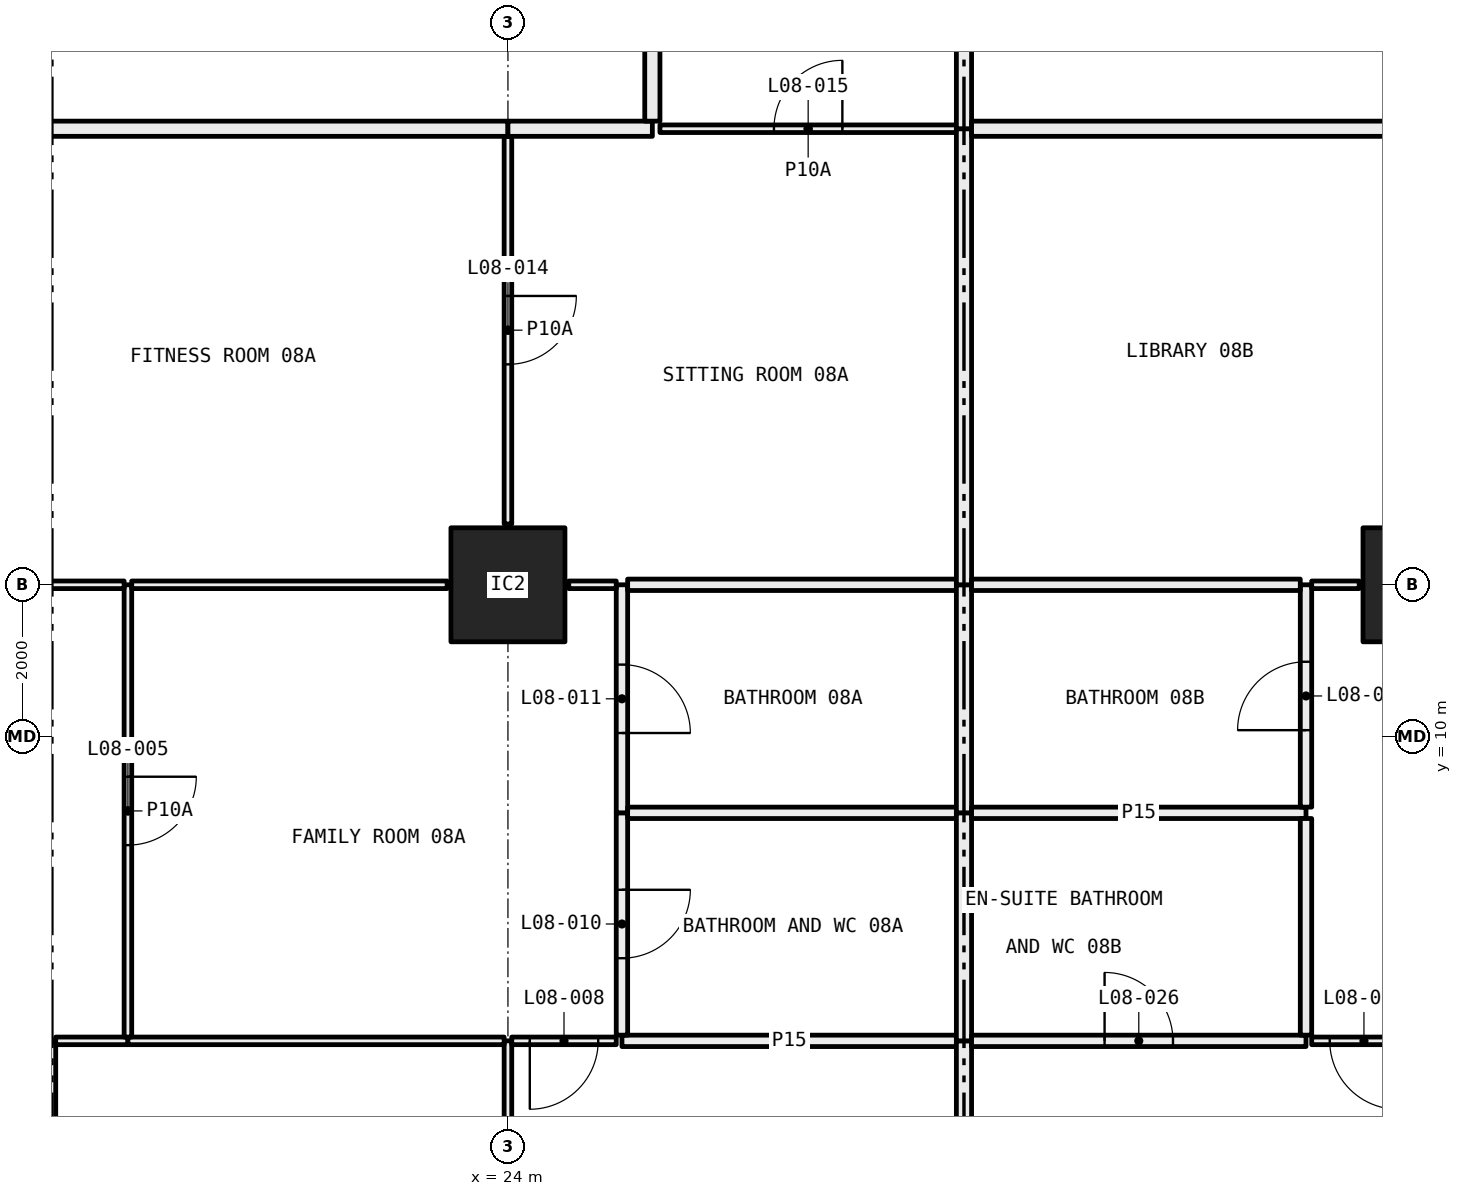
"""IFC4 building model, lengths in metres.
Left out: names, types, materials, properties, quantities, classifications, styles, units other than length and angle.
Written with IfcOpenShell. Run it as: python <this file> out.ifc"""

import sys

from ifc_helpers import new_model, si_unit, direction, frame, frame_2d, origin, origin_2d, place, context, subcontext, project, spatial, rectangle, hollow_rectangle, extrude, element, fill, save


model = new_model("IFC4")
c1 = context("Model", 3, precision=1e-05, world=origin(), true_north=direction((0.0, 1.0)))
c2 = subcontext(c1, "Body", "Model", "MODEL_VIEW")
j1 = project(units=[si_unit("LENGTHUNIT", "METRE"), si_unit("PLANEANGLEUNIT", "RADIAN")], contexts=[c1])
p1 = place(None, origin())
s1 = spatial("IfcSite", under=j1, at=p1, CompositionType="ELEMENT")
p2 = place(p1, origin())
s2 = spatial("IfcBuilding", under=s1, at=p2, CompositionType="ELEMENT")
p3 = place(p2, frame((0.0, 0.0, 40.35)))
s3 = spatial("IfcBuildingStorey", under=s2, at=p3, CompositionType="ELEMENT", Elevation=40.35)
for number, where, z_axis, x_axis in (
    (1, (24.0, 12.0, 0.0), (0.0, 0.0, 1.0), (1.0, 0.0, 0.0)),
    (2, (36.0, 12.0, 0.0), (0.0, 0.0, 1.0), (1.0, 0.0, 0.0)),
):
    element("IfcColumn", number, at=place(p3, frame(where, z_axis=z_axis, x_axis=x_axis)), inside=s3, PredefinedType="COLUMN", context=c2, shape_type="SweptSolid", body=[
        extrude(hollow_rectangle(XDim=1.5, YDim=1.5, WallThickness=0.065, at=origin_2d()), origin(), (0.0, 0.0, 1.0), 3.05),
    ])
p4 = place(p3, frame((18.0, 0.72, 0.0), z_axis=(0.0, 0.0, 1.0), x_axis=(0.0, 1.0, 0.0)))
e3 = element("IfcWall", 3, at=p4, inside=s3, PredefinedType="PARTITIONING", context=c2, shape_type="SweptSolid", body=[
    extrude(rectangle(XDim=5.28, YDim=0.1, at=frame_2d((2.64, 0.0))), origin(), (0.0, 0.0, 1.0), 3.05),
])
p5 = place(p4, frame((2.19, 0.0, 0.0)))
e4 = element("IfcOpeningElement", 4, at=p5, cuts=e3, PredefinedType="OPENING", context=c2, shape_type="SweptSolid", body=[
    extrude(rectangle(XDim=0.9, YDim=2.1, at=frame_2d((0.45, 1.05))), frame((0.0, 0.06, 0.0), z_axis=(0.0, -1.0, 0.0), x_axis=(1.0, 0.0, 0.0)), (0.0, 0.0, 1.0), 0.12),
])
p6 = place(p3, frame((24.0, 0.72, 0.0), z_axis=(0.0, 0.0, 1.0), x_axis=(0.0, 1.0, 0.0)))
e5 = element("IfcWall", 5, at=p6, inside=s3, PredefinedType="PARTITIONING", context=c2, shape_type="SweptSolid", body=[
    extrude(rectangle(XDim=5.28, YDim=0.1, at=frame_2d((2.64, 0.0))), origin(), (0.0, 0.0, 1.0), 2.45),
])
p7 = place(p3, frame((19.0, 6.0, 0.0), z_axis=(0.0, 0.0, 1.0), x_axis=(-1.0, 0.0, 0.0)))
e6 = element("IfcWall", 6, at=p7, inside=s3, PredefinedType="PARTITIONING", context=c2, shape_type="SweptSolid", body=[
    extrude(rectangle(XDim=0.95, YDim=0.1, at=frame_2d((0.475, 0.0))), origin(), (0.0, 0.0, 1.0), 3.05),
])
p8 = place(p3, frame((23.95, 6.0, 0.0), z_axis=(0.0, 0.0, 1.0), x_axis=(-1.0, 0.0, 0.0)))
e7 = element("IfcWall", 7, at=p8, inside=s3, PredefinedType="PARTITIONING", context=c2, shape_type="SweptSolid", body=[
    extrude(rectangle(XDim=4.95, YDim=0.1, at=frame_2d((2.475, 0.0))), origin(), (0.0, 0.0, 1.0), 2.45),
])
p9 = place(p3, frame((25.425, 6.0, 0.0), z_axis=(0.0, 0.0, 1.0), x_axis=(-1.0, 0.0, 0.0)))
e8 = element("IfcWall", 8, at=p9, inside=s3, PredefinedType="PARTITIONING", context=c2, shape_type="SweptSolid", body=[
    extrude(rectangle(XDim=1.375, YDim=0.1, at=frame_2d((0.688, 0.0))), origin(), (0.0, 0.0, 1.0), 2.45),
])
p10 = place(p9, frame((0.238, 0.0, 0.0)))
e9 = element("IfcOpeningElement", 9, at=p10, cuts=e8, PredefinedType="OPENING", context=c2, shape_type="SweptSolid", body=[
    extrude(rectangle(XDim=0.9, YDim=2.1, at=frame_2d((0.45, 1.05))), frame((0.0, 0.06, 0.0), z_axis=(0.0, -1.0, 0.0), x_axis=(1.0, 0.0, 0.0)), (0.0, 0.0, 1.0), 0.12),
])
p11 = place(p3, frame((29.9, 6.0, 0.0), z_axis=(0.0, 0.0, 1.0), x_axis=(-1.0, 0.0, 0.0)))
e10 = element("IfcWall", 10, at=p11, inside=s3, PredefinedType="PARTITIONING", context=c2, shape_type="SweptSolid", body=[
    extrude(rectangle(XDim=4.4, YDim=0.15, at=frame_2d((2.2, 0.0))), origin(), (0.0, 0.0, 1.0), 3.05),
])
p12 = place(p3, frame((30.0, 0.72, 0.0), z_axis=(0.0, 0.0, 1.0), x_axis=(0.0, 1.0, 0.0)))
e11 = element("IfcWall", 11, at=p12, inside=s3, PredefinedType="PARTITIONING", context=c2, shape_type="SweptSolid", body=[
    extrude(rectangle(XDim=5.28, YDim=0.2, at=frame_2d((2.64, 0.0))), origin(), (0.0, 0.0, 1.0), 3.05),
])
p13 = place(p3, frame((19.0, 6.05, 0.0), z_axis=(0.0, 0.0, 1.0), x_axis=(0.0, 1.0, 0.0)))
e12 = element("IfcWall", 12, at=p13, inside=s3, PredefinedType="PARTITIONING", context=c2, shape_type="SweptSolid", body=[
    extrude(rectangle(XDim=5.95, YDim=0.1, at=frame_2d((2.975, 0.0))), origin(), (0.0, 0.0, 1.0), 2.45),
])
p14 = place(p13, frame((2.525, 0.0, 0.0)))
e13 = element("IfcOpeningElement", 13, at=p14, cuts=e12, PredefinedType="OPENING", context=c2, shape_type="SweptSolid", body=[
    extrude(rectangle(XDim=0.9, YDim=2.1, at=frame_2d((0.45, 1.05))), frame((0.0, 0.06, 0.0), z_axis=(0.0, -1.0, 0.0), x_axis=(1.0, 0.0, 0.0)), (0.0, 0.0, 1.0), 0.12),
])
p15 = place(p3, frame((18.95, 12.0, 0.0), z_axis=(0.0, 0.0, 1.0), x_axis=(-1.0, 0.0, 0.0)))
e14 = element("IfcWall", 14, at=p15, inside=s3, PredefinedType="PARTITIONING", context=c2, shape_type="SweptSolid", body=[
    extrude(rectangle(XDim=2.45, YDim=0.1, at=frame_2d((1.225, 0.0))), origin(), (0.0, 0.0, 1.0), 2.45),
])
p16 = place(p3, frame((25.5, 6.075, 0.0), z_axis=(0.0, 0.0, 1.0), x_axis=(0.0, 1.0, 0.0)))
e15 = element("IfcWall", 15, at=p16, inside=s3, PredefinedType="PARTITIONING", context=c2, shape_type="SweptSolid", body=[
    extrude(rectangle(XDim=2.925, YDim=0.15, at=frame_2d((1.462, 0.0))), origin(), (0.0, 0.0, 1.0), 3.05),
])
p17 = place(p16, frame((1.012, 0.0, 0.0)))
e16 = element("IfcOpeningElement", 16, at=p17, cuts=e15, PredefinedType="OPENING", context=c2, shape_type="SweptSolid", body=[
    extrude(rectangle(XDim=0.9, YDim=2.1, at=frame_2d((0.45, 1.05))), frame((0.0, 0.085, 0.0), z_axis=(0.0, -1.0, 0.0), x_axis=(1.0, 0.0, 0.0)), (0.0, 0.0, 1.0), 0.17),
])
p18 = place(p3, frame((25.5, 9.0, 0.0), z_axis=(0.0, 0.0, 1.0), x_axis=(0.0, 1.0, 0.0)))
e17 = element("IfcWall", 17, at=p18, inside=s3, PredefinedType="PARTITIONING", context=c2, shape_type="SweptSolid", body=[
    extrude(rectangle(XDim=3.0, YDim=0.15, at=frame_2d((1.5, 0.0))), origin(), (0.0, 0.0, 1.0), 2.45),
])
p19 = place(p18, frame((1.05, 0.0, 0.0)))
e18 = element("IfcOpeningElement", 18, at=p19, cuts=e17, PredefinedType="OPENING", context=c2, shape_type="SweptSolid", body=[
    extrude(rectangle(XDim=0.9, YDim=2.1, at=frame_2d((0.45, 1.05))), frame((0.0, 0.085, 0.0), z_axis=(0.0, -1.0, 0.0), x_axis=(1.0, 0.0, 0.0)), (0.0, 0.0, 1.0), 0.17),
])
p20 = place(p3, frame((23.2, 12.0, 0.0), z_axis=(0.0, 0.0, 1.0), x_axis=(-1.0, 0.0, 0.0)))
e19 = element("IfcWall", 19, at=p20, inside=s3, PredefinedType="PARTITIONING", context=c2, shape_type="SweptSolid", body=[
    extrude(rectangle(XDim=4.15, YDim=0.1, at=frame_2d((2.075, 0.0))), origin(), (0.0, 0.0, 1.0), 2.45),
])
p21 = place(p3, frame((25.425, 12.0, 0.0), z_axis=(0.0, 0.0, 1.0), x_axis=(-1.0, 0.0, 0.0)))
e20 = element("IfcWall", 20, at=p21, inside=s3, PredefinedType="PARTITIONING", context=c2, shape_type="SweptSolid", body=[
    extrude(rectangle(XDim=0.625, YDim=0.1, at=frame_2d((0.312, 0.0))), origin(), (0.0, 0.0, 1.0), 2.45),
])
p22 = place(p3, frame((29.9, 9.0, 0.0), z_axis=(0.0, 0.0, 1.0), x_axis=(-1.0, 0.0, 0.0)))
e21 = element("IfcWall", 21, at=p22, inside=s3, PredefinedType="PARTITIONING", context=c2, shape_type="SweptSolid", body=[
    extrude(rectangle(XDim=4.325, YDim=0.15, at=frame_2d((2.163, 0.0))), origin(), (0.0, 0.0, 1.0), 3.05),
])
p23 = place(p3, frame((30.0, 6.0, 0.0), z_axis=(0.0, 0.0, 1.0), x_axis=(0.0, 1.0, 0.0)))
e22 = element("IfcWall", 22, at=p23, inside=s3, PredefinedType="PARTITIONING", context=c2, shape_type="SweptSolid", body=[
    extrude(rectangle(XDim=3.0, YDim=0.2, at=frame_2d((1.5, 0.0))), origin(), (0.0, 0.0, 1.0), 3.05),
])
p24 = place(p3, frame((29.9, 12.0, 0.0), z_axis=(0.0, 0.0, 1.0), x_axis=(-1.0, 0.0, 0.0)))
e23 = element("IfcWall", 23, at=p24, inside=s3, PredefinedType="PARTITIONING", context=c2, shape_type="SweptSolid", body=[
    extrude(rectangle(XDim=4.325, YDim=0.15, at=frame_2d((2.163, 0.0))), origin(), (0.0, 0.0, 1.0), 2.45),
])
p25 = place(p3, frame((30.0, 9.0, 0.0), z_axis=(0.0, 0.0, 1.0), x_axis=(0.0, 1.0, 0.0)))
e24 = element("IfcWall", 24, at=p25, inside=s3, PredefinedType="PARTITIONING", context=c2, shape_type="SweptSolid", body=[
    extrude(rectangle(XDim=3.0, YDim=0.2, at=frame_2d((1.5, 0.0))), origin(), (0.0, 0.0, 1.0), 2.45),
])
p26 = place(p3, frame((24.0, 12.8, 0.0), z_axis=(0.0, 0.0, 1.0), x_axis=(0.0, 1.0, 0.0)))
e25 = element("IfcWall", 25, at=p26, inside=s3, PredefinedType="PARTITIONING", context=c2, shape_type="SweptSolid", body=[
    extrude(rectangle(XDim=5.1, YDim=0.1, at=frame_2d((2.55, 0.0))), origin(), (0.0, 0.0, 1.0), 3.05),
])
p27 = place(p26, frame((2.1, 0.0, 0.0)))
e26 = element("IfcOpeningElement", 26, at=p27, cuts=e25, PredefinedType="OPENING", context=c2, shape_type="SweptSolid", body=[
    extrude(rectangle(XDim=0.9, YDim=2.1, at=frame_2d((0.45, 1.05))), frame((0.0, 0.06, 0.0), z_axis=(0.0, -1.0, 0.0), x_axis=(1.0, 0.0, 0.0)), (0.0, 0.0, 1.0), 0.12),
])
p28 = place(p3, frame((24.0, 18.0, 0.0), z_axis=(0.0, 0.0, 1.0), x_axis=(-1.0, 0.0, 0.0)))
e27 = element("IfcWall", 27, at=p28, inside=s3, PredefinedType="PARTITIONING", context=c2, shape_type="SweptSolid", body=[
    extrude(rectangle(XDim=7.5, YDim=0.2, at=frame_2d((3.75, 0.0))), origin(), (0.0, 0.0, 1.0), 3.05),
])
p29 = place(p3, frame((29.9, 18.0, 0.0), z_axis=(0.0, 0.0, 1.0), x_axis=(-1.0, 0.0, 0.0)))
e28 = element("IfcWall", 28, at=p29, inside=s3, PredefinedType="PARTITIONING", context=c2, shape_type="SweptSolid", body=[
    extrude(rectangle(XDim=3.9, YDim=0.1, at=frame_2d((1.95, 0.0))), origin(), (0.0, 0.0, 1.0), 3.05),
])
p30 = place(p29, frame((1.5, 0.0, 0.0)))
e29 = element("IfcOpeningElement", 29, at=p30, cuts=e28, PredefinedType="OPENING", context=c2, shape_type="SweptSolid", body=[
    extrude(rectangle(XDim=0.9, YDim=2.1, at=frame_2d((0.45, 1.05))), frame((0.0, 0.06, 0.0), z_axis=(0.0, -1.0, 0.0), x_axis=(1.0, 0.0, 0.0)), (0.0, 0.0, 1.0), 0.12),
])
p31 = place(p3, frame((30.0, 12.0, 0.0), z_axis=(0.0, 0.0, 1.0), x_axis=(0.0, 1.0, 0.0)))
e30 = element("IfcWall", 30, at=p31, inside=s3, PredefinedType="PARTITIONING", context=c2, shape_type="SweptSolid", body=[
    extrude(rectangle(XDim=6.0, YDim=0.2, at=frame_2d((3.0, 0.0))), origin(), (0.0, 0.0, 1.0), 2.45),
])
p32 = place(p3, frame((25.9, 18.0, 0.0), z_axis=(0.0, 0.0, 1.0), x_axis=(-1.0, 0.0, 0.0)))
e31 = element("IfcWall", 31, at=p32, inside=s3, PredefinedType="PARTITIONING", context=c2, shape_type="SweptSolid", body=[
    extrude(rectangle(XDim=1.9, YDim=0.2, at=frame_2d((0.95, 0.0))), origin(), (0.0, 0.0, 1.0), 3.05),
])
p33 = place(p3, frame((30.0, 18.0, 0.0), z_axis=(0.0, 0.0, 1.0), x_axis=(0.0, 1.0, 0.0)))
e32 = element("IfcWall", 32, at=p33, inside=s3, PredefinedType="PARTITIONING", context=c2, shape_type="SweptSolid", body=[
    extrude(rectangle(XDim=6.3, YDim=0.2, at=frame_2d((3.15, 0.0))), origin(), (0.0, 0.0, 1.0), 2.45),
])
p34 = place(p3, frame((25.9, 23.9, 0.0), z_axis=(0.0, 0.0, 1.0), x_axis=(0.0, -1.0, 0.0)))
e33 = element("IfcWall", 33, at=p34, inside=s3, PredefinedType="PARTITIONING", context=c2, shape_type="SweptSolid", body=[
    extrude(rectangle(XDim=5.8, YDim=0.2, at=frame_2d((2.9, 0.0))), origin(), (0.0, 0.0, 1.0), 3.05),
])
p35 = place(p3, frame((34.5, 6.0, 0.0), z_axis=(0.0, 0.0, 1.0), x_axis=(-1.0, 0.0, 0.0)))
e34 = element("IfcWall", 34, at=p35, inside=s3, PredefinedType="PARTITIONING", context=c2, shape_type="SweptSolid", body=[
    extrude(rectangle(XDim=4.4, YDim=0.15, at=frame_2d((2.2, 0.0))), origin(), (0.0, 0.0, 1.0), 3.05),
])
p36 = place(p35, frame((1.75, 0.0, 0.0)))
e35 = element("IfcOpeningElement", 35, at=p36, cuts=e34, PredefinedType="OPENING", context=c2, shape_type="SweptSolid", body=[
    extrude(rectangle(XDim=0.9, YDim=2.1, at=frame_2d((0.45, 1.05))), frame((0.0, 0.085, 0.0), z_axis=(0.0, -1.0, 0.0), x_axis=(1.0, 0.0, 0.0)), (0.0, 0.0, 1.0), 0.17),
])
p37 = place(p3, frame((35.95, 6.0, 0.0), z_axis=(0.0, 0.0, 1.0), x_axis=(-1.0, 0.0, 0.0)))
e36 = element("IfcWall", 36, at=p37, inside=s3, PredefinedType="PARTITIONING", context=c2, shape_type="SweptSolid", body=[
    extrude(rectangle(XDim=1.375, YDim=0.1, at=frame_2d((0.688, 0.0))), origin(), (0.0, 0.0, 1.0), 2.45),
])
p38 = place(p37, frame((0.238, 0.0, 0.0)))
e37 = element("IfcOpeningElement", 37, at=p38, cuts=e36, PredefinedType="OPENING", context=c2, shape_type="SweptSolid", body=[
    extrude(rectangle(XDim=0.9, YDim=2.1, at=frame_2d((0.45, 1.05))), frame((0.0, 0.06, 0.0), z_axis=(0.0, -1.0, 0.0), x_axis=(1.0, 0.0, 0.0)), (0.0, 0.0, 1.0), 0.12),
])
p39 = place(p3, frame((34.5, 9.0, 0.0), z_axis=(0.0, 0.0, 1.0), x_axis=(-1.0, 0.0, 0.0)))
e38 = element("IfcWall", 38, at=p39, inside=s3, PredefinedType="PARTITIONING", context=c2, shape_type="SweptSolid", body=[
    extrude(rectangle(XDim=4.4, YDim=0.15, at=frame_2d((2.2, 0.0))), origin(), (0.0, 0.0, 1.0), 3.05),
])
p40 = place(p3, frame((34.5, 6.075, 0.0), z_axis=(0.0, 0.0, 1.0), x_axis=(0.0, 1.0, 0.0)))
e39 = element("IfcWall", 39, at=p40, inside=s3, PredefinedType="PARTITIONING", context=c2, shape_type="SweptSolid", body=[
    extrude(rectangle(XDim=2.85, YDim=0.15, at=frame_2d((1.425, 0.0))), origin(), (0.0, 0.0, 1.0), 3.05),
])
p41 = place(p3, frame((34.5, 9.075, 0.0), z_axis=(0.0, 0.0, 1.0), x_axis=(0.0, 1.0, 0.0)))
e40 = element("IfcWall", 40, at=p41, inside=s3, PredefinedType="PARTITIONING", context=c2, shape_type="SweptSolid", body=[
    extrude(rectangle(XDim=2.925, YDim=0.15, at=frame_2d((1.462, 0.0))), origin(), (0.0, 0.0, 1.0), 2.45),
])
p42 = place(p41, frame((1.012, 0.0, 0.0)))
e41 = element("IfcOpeningElement", 41, at=p42, cuts=e40, PredefinedType="OPENING", context=c2, shape_type="SweptSolid", body=[
    extrude(rectangle(XDim=0.9, YDim=2.1, at=frame_2d((0.45, 1.05))), frame((0.0, 0.085, 0.0), z_axis=(0.0, -1.0, 0.0), x_axis=(1.0, 0.0, 0.0)), (0.0, 0.0, 1.0), 0.17),
])
p43 = place(p3, frame((34.425, 12.0, 0.0), z_axis=(0.0, 0.0, 1.0), x_axis=(-1.0, 0.0, 0.0)))
e42 = element("IfcWall", 42, at=p43, inside=s3, PredefinedType="PARTITIONING", context=c2, shape_type="SweptSolid", body=[
    extrude(rectangle(XDim=4.325, YDim=0.15, at=frame_2d((2.163, 0.0))), origin(), (0.0, 0.0, 1.0), 2.45),
])
p44 = place(p3, frame((35.2, 12.0, 0.0), z_axis=(0.0, 0.0, 1.0), x_axis=(-1.0, 0.0, 0.0)))
e43 = element("IfcWall", 43, at=p44, inside=s3, PredefinedType="PARTITIONING", context=c2, shape_type="SweptSolid", body=[
    extrude(rectangle(XDim=0.625, YDim=0.1, at=frame_2d((0.312, 0.0))), origin(), (0.0, 0.0, 1.0), 2.45),
])
p45 = place(p3, frame((36.0, 18.0, 0.0), z_axis=(0.0, 0.0, 1.0), x_axis=(-1.0, 0.0, 0.0)))
e44 = element("IfcWall", 44, at=p45, inside=s3, PredefinedType="PARTITIONING", context=c2, shape_type="SweptSolid", body=[
    extrude(rectangle(XDim=5.9, YDim=0.2, at=frame_2d((2.95, 0.0))), origin(), (0.0, 0.0, 1.0), 2.45),
])
p46 = place(p14, frame((0.9, 0.0, 0.0), x_axis=(-1.0, 0.0, 0.0)))
e45 = element("IfcDoor", 45, at=p46, inside=s3, OperationType="SINGLE_SWING_RIGHT", PredefinedType="DOOR", context=c2, shape_type="SweptSolid", body=[
    extrude(rectangle(XDim=0.9, YDim=2.1, at=frame_2d((0.45, 1.05))), frame((0.0, 0.025, 0.0), z_axis=(0.0, -1.0, 0.0), x_axis=(1.0, 0.0, 0.0)), (0.0, 0.0, 1.0), 0.05),
])
fill(e13, e45)
p47 = place(p10, origin())
e46 = element("IfcDoor", 46, at=p47, inside=s3, OperationType="SINGLE_SWING_LEFT", PredefinedType="DOOR", context=c2, shape_type="SweptSolid", body=[
    extrude(rectangle(XDim=0.9, YDim=2.1, at=frame_2d((0.45, 1.05))), frame((0.0, 0.025, 0.0), z_axis=(0.0, -1.0, 0.0), x_axis=(1.0, 0.0, 0.0)), (0.0, 0.0, 1.0), 0.05),
])
fill(e9, e46)
p48 = place(p17, frame((0.9, 0.0, 0.0), x_axis=(-1.0, 0.0, 0.0)))
e47 = element("IfcDoor", 47, at=p48, inside=s3, OperationType="SINGLE_SWING_RIGHT", PredefinedType="DOOR", context=c2, shape_type="SweptSolid", body=[
    extrude(rectangle(XDim=0.9, YDim=2.1, at=frame_2d((0.45, 1.05))), frame((0.0, 0.025, 0.0), z_axis=(0.0, -1.0, 0.0), x_axis=(1.0, 0.0, 0.0)), (0.0, 0.0, 1.0), 0.05),
])
fill(e16, e47)
p49 = place(p19, frame((0.9, 0.0, 0.0), x_axis=(-1.0, 0.0, 0.0)))
e48 = element("IfcDoor", 48, at=p49, inside=s3, OperationType="SINGLE_SWING_LEFT", PredefinedType="DOOR", context=c2, shape_type="SweptSolid", body=[
    extrude(rectangle(XDim=0.9, YDim=2.1, at=frame_2d((0.45, 1.05))), frame((0.0, 0.025, 0.0), z_axis=(0.0, -1.0, 0.0), x_axis=(1.0, 0.0, 0.0)), (0.0, 0.0, 1.0), 0.05),
])
fill(e18, e48)
p50 = place(p27, frame((0.9, 0.0, 0.0), x_axis=(-1.0, 0.0, 0.0)))
e49 = element("IfcDoor", 49, at=p50, inside=s3, OperationType="SINGLE_SWING_RIGHT", PredefinedType="DOOR", context=c2, shape_type="SweptSolid", body=[
    extrude(rectangle(XDim=0.9, YDim=2.1, at=frame_2d((0.45, 1.05))), frame((0.0, 0.025, 0.0), z_axis=(0.0, -1.0, 0.0), x_axis=(1.0, 0.0, 0.0)), (0.0, 0.0, 1.0), 0.05),
])
fill(e26, e49)
p51 = place(p30, frame((0.9, 0.0, 0.0), x_axis=(-1.0, 0.0, 0.0)))
e50 = element("IfcDoor", 50, at=p51, inside=s3, OperationType="SINGLE_SWING_LEFT", PredefinedType="DOOR", context=c2, shape_type="SweptSolid", body=[
    extrude(rectangle(XDim=0.9, YDim=2.1, at=frame_2d((0.45, 1.05))), frame((0.0, 0.025, 0.0), z_axis=(0.0, -1.0, 0.0), x_axis=(1.0, 0.0, 0.0)), (0.0, 0.0, 1.0), 0.05),
])
fill(e29, e50)
p52 = place(p38, origin())
e51 = element("IfcDoor", 51, at=p52, inside=s3, OperationType="SINGLE_SWING_RIGHT", PredefinedType="DOOR", context=c2, shape_type="SweptSolid", body=[
    extrude(rectangle(XDim=0.9, YDim=2.1, at=frame_2d((0.45, 1.05))), frame((0.0, 0.025, 0.0), z_axis=(0.0, -1.0, 0.0), x_axis=(1.0, 0.0, 0.0)), (0.0, 0.0, 1.0), 0.05),
])
fill(e37, e51)
p53 = place(p36, frame((0.9, 0.0, 0.0), x_axis=(-1.0, 0.0, 0.0)))
e52 = element("IfcDoor", 52, at=p53, inside=s3, OperationType="SINGLE_SWING_RIGHT", PredefinedType="DOOR", context=c2, shape_type="SweptSolid", body=[
    extrude(rectangle(XDim=0.9, YDim=2.1, at=frame_2d((0.45, 1.05))), frame((0.0, 0.025, 0.0), z_axis=(0.0, -1.0, 0.0), x_axis=(1.0, 0.0, 0.0)), (0.0, 0.0, 1.0), 0.05),
])
fill(e35, e52)
p54 = place(p42, origin())
e53 = element("IfcDoor", 53, at=p54, inside=s3, OperationType="SINGLE_SWING_RIGHT", PredefinedType="DOOR", context=c2, shape_type="SweptSolid", body=[
    extrude(rectangle(XDim=0.9, YDim=2.1, at=frame_2d((0.45, 1.05))), frame((0.0, 0.025, 0.0), z_axis=(0.0, -1.0, 0.0), x_axis=(1.0, 0.0, 0.0)), (0.0, 0.0, 1.0), 0.05),
])
fill(e41, e53)
save(model, sys.argv[1])
